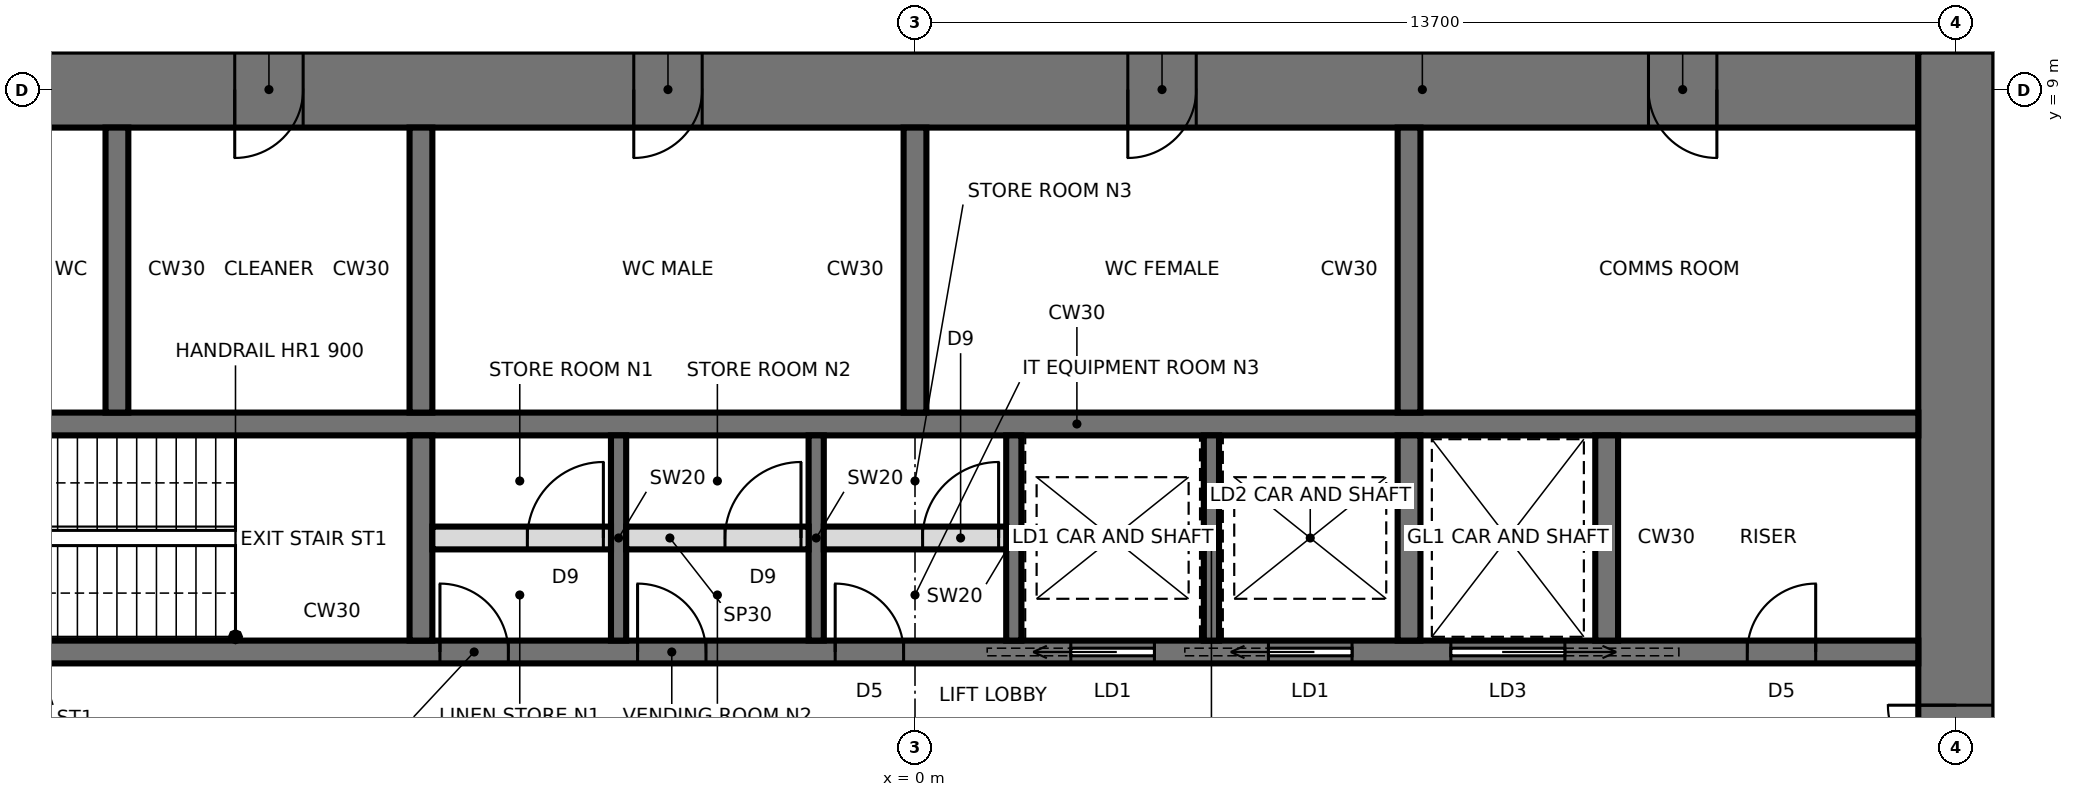
"""IFC4 building model, lengths in metres.
Left out: names, types, materials, properties, quantities, classifications, styles, units other than length and angle.
Written with IfcOpenShell. Run it as: python <this file> out.ifc"""

import sys

from ifc_helpers import new_model, si_unit, direction, frame, frame_2d, origin, place, context, subcontext, project, spatial, rectangle, extrude, element, fill, save


model = new_model("IFC4")
c1 = context("Model", 3, precision=1e-05, world=origin(), true_north=direction((0.0, 1.0)))
c2 = subcontext(c1, "Body", "Model", "MODEL_VIEW")
j1 = project(units=[si_unit("LENGTHUNIT", "METRE"), si_unit("PLANEANGLEUNIT", "RADIAN")], contexts=[c1])
p1 = place(None, origin())
s1 = spatial("IfcSite", under=j1, at=p1, CompositionType="ELEMENT")
p2 = place(p1, origin())
s2 = spatial("IfcBuilding", under=s1, at=p2, CompositionType="ELEMENT")
p3 = place(p2, frame((0.0, 0.0, 268.6)))
s3 = spatial("IfcBuildingStorey", under=s2, at=p3, CompositionType="ELEMENT", Elevation=268.6)
p4 = place(p3, frame((13.2, 9.0, 0.0), z_axis=(0.0, 0.0, 1.0), x_axis=(-1.0, 0.0, 0.0)))
e1 = element("IfcWall", 1, at=p4, inside=s3, PredefinedType="SHEAR", context=c2, shape_type="SweptSolid", body=[
    extrude(rectangle(XDim=26.4, YDim=1.0, at=frame_2d((13.2, 0.0))), origin(), (0.0, 0.0, 1.0), 4.2),
])
p5 = place(p4, frame((2.65, 0.0, 0.0)))
e2 = element("IfcOpeningElement", 2, at=p5, cuts=e1, PredefinedType="OPENING", context=c2, shape_type="SweptSolid", body=[
    extrude(rectangle(XDim=0.9, YDim=2.1, at=frame_2d((0.45, 1.05))), frame((0.0, 0.51, 0.0), z_axis=(0.0, -1.0, 0.0), x_axis=(1.0, 0.0, 0.0)), (0.0, 0.0, 1.0), 1.02),
])
p6 = place(p4, frame((9.5, 0.0, 0.0)))
e3 = element("IfcOpeningElement", 3, at=p6, cuts=e1, PredefinedType="OPENING", context=c2, shape_type="SweptSolid", body=[
    extrude(rectangle(XDim=0.9, YDim=2.1, at=frame_2d((0.45, 1.05))), frame((0.0, 0.51, 0.0), z_axis=(0.0, -1.0, 0.0), x_axis=(1.0, 0.0, 0.0)), (0.0, 0.0, 1.0), 1.02),
])
p7 = place(p4, frame((16.0, 0.0, 0.0)))
e4 = element("IfcOpeningElement", 4, at=p7, cuts=e1, PredefinedType="OPENING", context=c2, shape_type="SweptSolid", body=[
    extrude(rectangle(XDim=0.9, YDim=2.1, at=frame_2d((0.45, 1.05))), frame((0.0, 0.51, 0.0), z_axis=(0.0, -1.0, 0.0), x_axis=(1.0, 0.0, 0.0)), (0.0, 0.0, 1.0), 1.02),
])
p8 = place(p4, frame((21.25, 0.0, 0.0)))
e5 = element("IfcOpeningElement", 5, at=p8, cuts=e1, PredefinedType="OPENING", context=c2, shape_type="SweptSolid", body=[
    extrude(rectangle(XDim=0.9, YDim=2.1, at=frame_2d((0.45, 1.05))), frame((0.0, 0.51, 0.0), z_axis=(0.0, -1.0, 0.0), x_axis=(1.0, 0.0, 0.0)), (0.0, 0.0, 1.0), 1.02),
])
p9 = place(p4, frame((24.8, 0.0, 0.0)))
e6 = element("IfcOpeningElement", 6, at=p9, cuts=e1, PredefinedType="OPENING", context=c2, shape_type="SweptSolid", body=[
    extrude(rectangle(XDim=1.0, YDim=2.1, at=frame_2d((0.5, 1.05))), frame((0.0, 0.51, 0.0), z_axis=(0.0, -1.0, 0.0), x_axis=(1.0, 0.0, 0.0)), (0.0, 0.0, 1.0), 1.02),
])
p10 = place(p3, frame((13.7, -9.5, 0.0), z_axis=(0.0, 0.0, 1.0), x_axis=(0.0, 1.0, 0.0)))
e7 = element("IfcWall", 7, at=p10, inside=s3, PredefinedType="SHEAR", context=c2, shape_type="SweptSolid", body=[
    extrude(rectangle(XDim=19.0, YDim=1.0, at=frame_2d((9.5, 0.0))), origin(), (0.0, 0.0, 1.0), 4.2),
])
p11 = place(p10, frame((8.6, 0.0, 0.0)))
e8 = element("IfcOpeningElement", 8, at=p11, cuts=e7, PredefinedType="OPENING", context=c2, shape_type="SweptSolid", body=[
    extrude(rectangle(XDim=1.8, YDim=2.4, at=frame_2d((0.9, 1.2))), frame((0.0, 0.51, 0.0), z_axis=(0.0, -1.0, 0.0), x_axis=(1.0, 0.0, 0.0)), (0.0, 0.0, 1.0), 1.02),
])
p12 = place(p3, frame((-13.2, 1.6, 0.0), z_axis=(0.0, 0.0, 1.0), x_axis=(1.0, 0.0, 0.0)))
e9 = element("IfcWall", 9, at=p12, inside=s3, PredefinedType="SHEAR", context=c2, shape_type="SweptSolid", body=[
    extrude(rectangle(XDim=26.4, YDim=0.3, at=frame_2d((13.2, 0.0))), origin(), (0.0, 0.0, 1.0), 4.2),
])
p13 = place(p12, frame((0.25, 0.0, 0.0)))
e10 = element("IfcOpeningElement", 10, at=p13, cuts=e9, PredefinedType="OPENING", context=c2, shape_type="SweptSolid", body=[
    extrude(rectangle(XDim=1.0, YDim=2.1, at=frame_2d((0.5, 1.05))), frame((0.0, 0.16, 0.0), z_axis=(0.0, -1.0, 0.0), x_axis=(1.0, 0.0, 0.0)), (0.0, 0.0, 1.0), 0.32),
])
p14 = place(p12, frame((20.25, 0.0, 0.0)))
e11 = element("IfcOpeningElement", 11, at=p14, cuts=e9, PredefinedType="OPENING", context=c2, shape_type="SweptSolid", body=[
    extrude(rectangle(XDim=1.5, YDim=2.4, at=frame_2d((0.75, 1.2))), frame((0.0, 0.16, 0.0), z_axis=(0.0, -1.0, 0.0), x_axis=(1.0, 0.0, 0.0)), (0.0, 0.0, 1.0), 0.32),
])
p15 = place(p12, frame((6.95, 0.0, 0.0)))
e12 = element("IfcOpeningElement", 12, at=p15, cuts=e9, PredefinedType="OPENING", context=c2, shape_type="SweptSolid", body=[
    extrude(rectangle(XDim=0.9, YDim=2.1, at=frame_2d((0.45, 1.05))), frame((0.0, 0.16, 0.0), z_axis=(0.0, -1.0, 0.0), x_axis=(1.0, 0.0, 0.0)), (0.0, 0.0, 1.0), 0.32),
])
p16 = place(p12, frame((9.55, 0.0, 0.0)))
e13 = element("IfcOpeningElement", 13, at=p16, cuts=e9, PredefinedType="OPENING", context=c2, shape_type="SweptSolid", body=[
    extrude(rectangle(XDim=0.9, YDim=2.1, at=frame_2d((0.45, 1.05))), frame((0.0, 0.16, 0.0), z_axis=(0.0, -1.0, 0.0), x_axis=(1.0, 0.0, 0.0)), (0.0, 0.0, 1.0), 0.32),
])
p17 = place(p12, frame((12.15, 0.0, 0.0)))
e14 = element("IfcOpeningElement", 14, at=p17, cuts=e9, PredefinedType="OPENING", context=c2, shape_type="SweptSolid", body=[
    extrude(rectangle(XDim=0.9, YDim=2.1, at=frame_2d((0.45, 1.05))), frame((0.0, 0.16, 0.0), z_axis=(0.0, -1.0, 0.0), x_axis=(1.0, 0.0, 0.0)), (0.0, 0.0, 1.0), 0.32),
])
p18 = place(p12, frame((15.25, 0.0, 0.0)))
e15 = element("IfcOpeningElement", 15, at=p18, cuts=e9, PredefinedType="OPENING", context=c2, shape_type="SweptSolid", body=[
    extrude(rectangle(XDim=1.1, YDim=2.3, at=frame_2d((0.55, 1.15))), frame((0.0, 0.16, 0.0), z_axis=(0.0, -1.0, 0.0), x_axis=(1.0, 0.0, 0.0)), (0.0, 0.0, 1.0), 0.32),
])
p19 = place(p12, frame((17.85, 0.0, 0.0)))
e16 = element("IfcOpeningElement", 16, at=p19, cuts=e9, PredefinedType="OPENING", context=c2, shape_type="SweptSolid", body=[
    extrude(rectangle(XDim=1.1, YDim=2.3, at=frame_2d((0.55, 1.15))), frame((0.0, 0.16, 0.0), z_axis=(0.0, -1.0, 0.0), x_axis=(1.0, 0.0, 0.0)), (0.0, 0.0, 1.0), 0.32),
])
p20 = place(p12, frame((24.15, 0.0, 0.0)))
e17 = element("IfcOpeningElement", 17, at=p20, cuts=e9, PredefinedType="OPENING", context=c2, shape_type="SweptSolid", body=[
    extrude(rectangle(XDim=0.9, YDim=2.1, at=frame_2d((0.45, 1.05))), frame((0.0, 0.16, 0.0), z_axis=(0.0, -1.0, 0.0), x_axis=(1.0, 0.0, 0.0)), (0.0, 0.0, 1.0), 0.32),
])
p21 = place(p3, frame((-13.2, 4.6, 0.0), z_axis=(0.0, 0.0, 1.0), x_axis=(1.0, 0.0, 0.0)))
e18 = element("IfcWall", 18, at=p21, inside=s3, PredefinedType="SHEAR", context=c2, shape_type="SweptSolid", body=[
    extrude(rectangle(XDim=26.4, YDim=0.3, at=frame_2d((13.2, 0.0))), origin(), (0.0, 0.0, 1.0), 4.2),
])
p22 = place(p3, frame((-6.5, 1.75, 0.0), z_axis=(0.0, 0.0, 1.0), x_axis=(0.0, 1.0, 0.0)))
e19 = element("IfcWall", 19, at=p22, inside=s3, PredefinedType="SHEAR", context=c2, shape_type="SweptSolid", body=[
    extrude(rectangle(XDim=2.7, YDim=0.3, at=frame_2d((1.35, 0.0))), origin(), (0.0, 0.0, 1.0), 4.2),
])
p23 = place(p3, frame((-6.5, 4.75, 0.0), z_axis=(0.0, 0.0, 1.0), x_axis=(0.0, 1.0, 0.0)))
e20 = element("IfcWall", 20, at=p23, inside=s3, PredefinedType="SHEAR", context=c2, shape_type="SweptSolid", body=[
    extrude(rectangle(XDim=3.75, YDim=0.3, at=frame_2d((1.875, 0.0))), origin(), (0.0, 0.0, 1.0), 4.2),
])
p24 = place(p3, frame((6.5, 1.75, 0.0), z_axis=(0.0, 0.0, 1.0), x_axis=(0.0, 1.0, 0.0)))
e21 = element("IfcWall", 21, at=p24, inside=s3, PredefinedType="SHEAR", context=c2, shape_type="SweptSolid", body=[
    extrude(rectangle(XDim=2.7, YDim=0.3, at=frame_2d((1.35, 0.0))), origin(), (0.0, 0.0, 1.0), 4.2),
])
p25 = place(p3, frame((6.5, 4.75, 0.0), z_axis=(0.0, 0.0, 1.0), x_axis=(0.0, 1.0, 0.0)))
e22 = element("IfcWall", 22, at=p25, inside=s3, PredefinedType="SHEAR", context=c2, shape_type="SweptSolid", body=[
    extrude(rectangle(XDim=3.75, YDim=0.3, at=frame_2d((1.875, 0.0))), origin(), (0.0, 0.0, 1.0), 4.2),
])
for number, where, z_axis, x_axis in (
    (23, (-3.9, 1.75, 0.0), (0.0, 0.0, 1.0), (0.0, 1.0, 0.0)),
    (24, (-1.3, 1.75, 0.0), (0.0, 0.0, 1.0), (0.0, 1.0, 0.0)),
    (25, (1.3, 1.75, 0.0), (0.0, 0.0, 1.0), (0.0, 1.0, 0.0)),
    (26, (3.9, 1.75, 0.0), (0.0, 0.0, 1.0), (0.0, 1.0, 0.0)),
):
    element("IfcWall", number, at=place(p3, frame(where, z_axis=z_axis, x_axis=x_axis)), inside=s3, PredefinedType="SHEAR", context=c2, shape_type="SweptSolid", body=[
        extrude(rectangle(XDim=2.7, YDim=0.2, at=frame_2d((1.35, 0.0))), origin(), (0.0, 0.0, 1.0), 4.2),
    ])
for number, where, z_axis, x_axis in (
    (27, (0.0, 4.75, 0.0), (0.0, 0.0, 1.0), (0.0, 1.0, 0.0)),
    (28, (-10.5, 4.75, 0.0), (0.0, 0.0, 1.0), (0.0, 1.0, 0.0)),
):
    element("IfcWall", number, at=place(p3, frame(where, z_axis=z_axis, x_axis=x_axis)), inside=s3, PredefinedType="SHEAR", context=c2, shape_type="SweptSolid", body=[
        extrude(rectangle(XDim=3.75, YDim=0.3, at=frame_2d((1.875, 0.0))), origin(), (0.0, 0.0, 1.0), 4.2),
    ])
p26 = place(p3, frame((9.1, 1.75, 0.0), z_axis=(0.0, 0.0, 1.0), x_axis=(0.0, 1.0, 0.0)))
e29 = element("IfcWall", 29, at=p26, inside=s3, PredefinedType="SHEAR", context=c2, shape_type="SweptSolid", body=[
    extrude(rectangle(XDim=2.7, YDim=0.3, at=frame_2d((1.35, 0.0))), origin(), (0.0, 0.0, 1.0), 4.2),
])
p27 = place(p3, frame((-6.35, 3.1, 0.0), z_axis=(0.0, 0.0, 1.0), x_axis=(1.0, 0.0, 0.0)))
e30 = element("IfcWall", 30, at=p27, inside=s3, PredefinedType="PARTITIONING", context=c2, shape_type="SweptSolid", body=[
    extrude(rectangle(XDim=2.35, YDim=0.3, at=frame_2d((1.175, 0.0))), origin(), (0.0, 0.0, 1.0), 4.04),
])
p28 = place(p27, frame((1.25, 0.0, 0.0)))
e31 = element("IfcOpeningElement", 31, at=p28, cuts=e30, PredefinedType="OPENING", context=c2, shape_type="SweptSolid", body=[
    extrude(rectangle(XDim=1.0, YDim=2.4, at=frame_2d((0.5, 1.2))), frame((0.0, 0.16, 0.0), z_axis=(0.0, -1.0, 0.0), x_axis=(1.0, 0.0, 0.0)), (0.0, 0.0, 1.0), 0.32),
])
p29 = place(p3, frame((-3.8, 3.1, 0.0), z_axis=(0.0, 0.0, 1.0), x_axis=(1.0, 0.0, 0.0)))
e32 = element("IfcWall", 32, at=p29, inside=s3, PredefinedType="PARTITIONING", context=c2, shape_type="SweptSolid", body=[
    extrude(rectangle(XDim=2.4, YDim=0.3, at=frame_2d((1.2, 0.0))), origin(), (0.0, 0.0, 1.0), 4.04),
])
p30 = place(p29, frame((1.3, 0.0, 0.0)))
e33 = element("IfcOpeningElement", 33, at=p30, cuts=e32, PredefinedType="OPENING", context=c2, shape_type="SweptSolid", body=[
    extrude(rectangle(XDim=1.0, YDim=2.4, at=frame_2d((0.5, 1.2))), frame((0.0, 0.16, 0.0), z_axis=(0.0, -1.0, 0.0), x_axis=(1.0, 0.0, 0.0)), (0.0, 0.0, 1.0), 0.32),
])
p31 = place(p3, frame((-1.2, 3.1, 0.0), z_axis=(0.0, 0.0, 1.0), x_axis=(1.0, 0.0, 0.0)))
e34 = element("IfcWall", 34, at=p31, inside=s3, PredefinedType="PARTITIONING", context=c2, shape_type="SweptSolid", body=[
    extrude(rectangle(XDim=2.4, YDim=0.3, at=frame_2d((1.2, 0.0))), origin(), (0.0, 0.0, 1.0), 4.04),
])
p32 = place(p31, frame((1.3, 0.0, 0.0)))
e35 = element("IfcOpeningElement", 35, at=p32, cuts=e34, PredefinedType="OPENING", context=c2, shape_type="SweptSolid", body=[
    extrude(rectangle(XDim=1.0, YDim=2.4, at=frame_2d((0.5, 1.2))), frame((0.0, 0.16, 0.0), z_axis=(0.0, -1.0, 0.0), x_axis=(1.0, 0.0, 0.0)), (0.0, 0.0, 1.0), 0.32),
])
p33 = place(p11, origin())
e36 = element("IfcDoor", 36, at=p33, inside=s3, OperationType="DOUBLE_DOOR_SINGLE_SWING", PredefinedType="DOOR", context=c2, shape_type="SweptSolid", body=[
    extrude(rectangle(XDim=1.72, YDim=2.36, at=frame_2d((0.9, 1.18))), frame((0.0, 0.025, 0.0), z_axis=(0.0, -1.0, 0.0), x_axis=(1.0, 0.0, 0.0)), (0.0, 0.0, 1.0), 0.05),
    extrude(rectangle(XDim=0.04, YDim=2.4, at=frame_2d((0.02, 1.2))), frame((0.0, 0.25, 0.0), z_axis=(0.0, -1.0, 0.0), x_axis=(1.0, 0.0, 0.0)), (0.0, 0.0, 1.0), 0.5),
    extrude(rectangle(XDim=0.04, YDim=2.4, at=frame_2d((1.78, 1.2))), frame((0.0, 0.25, 0.0), z_axis=(0.0, -1.0, 0.0), x_axis=(1.0, 0.0, 0.0)), (0.0, 0.0, 1.0), 0.5),
    extrude(rectangle(XDim=1.72, YDim=0.04, at=frame_2d((0.9, 2.38))), frame((0.0, 0.25, 0.0), z_axis=(0.0, -1.0, 0.0), x_axis=(1.0, 0.0, 0.0)), (0.0, 0.0, 1.0), 0.5),
])
fill(e8, e36)
p34 = place(p14, origin())
e37 = element("IfcDoor", 37, at=p34, inside=s3, OperationType="SLIDING_TO_RIGHT", PredefinedType="DOOR", context=c2, shape_type="SweptSolid", body=[
    extrude(rectangle(XDim=1.5, YDim=2.4, at=frame_2d((0.75, 1.2))), frame((0.0, 0.025, 0.0), z_axis=(0.0, -1.0, 0.0), x_axis=(1.0, 0.0, 0.0)), (0.0, 0.0, 1.0), 0.05),
])
fill(e11, e37)
p35 = place(p28, origin())
e38 = element("IfcDoor", 38, at=p35, inside=s3, OperationType="SINGLE_SWING_RIGHT", PredefinedType="DOOR", context=c2, shape_type="SweptSolid", body=[
    extrude(rectangle(XDim=1.0, YDim=2.4, at=frame_2d((0.5, 1.2))), frame((0.0, 0.025, 0.0), z_axis=(0.0, -1.0, 0.0), x_axis=(1.0, 0.0, 0.0)), (0.0, 0.0, 1.0), 0.05),
])
fill(e31, e38)
p36 = place(p15, origin())
e39 = element("IfcDoor", 39, at=p36, inside=s3, OperationType="SINGLE_SWING_LEFT", PredefinedType="DOOR", context=c2, shape_type="SweptSolid", body=[
    extrude(rectangle(XDim=0.9, YDim=2.1, at=frame_2d((0.45, 1.05))), frame((0.0, 0.025, 0.0), z_axis=(0.0, -1.0, 0.0), x_axis=(1.0, 0.0, 0.0)), (0.0, 0.0, 1.0), 0.05),
])
fill(e12, e39)
p37 = place(p30, origin())
e40 = element("IfcDoor", 40, at=p37, inside=s3, OperationType="SINGLE_SWING_RIGHT", PredefinedType="DOOR", context=c2, shape_type="SweptSolid", body=[
    extrude(rectangle(XDim=1.0, YDim=2.4, at=frame_2d((0.5, 1.2))), frame((0.0, 0.025, 0.0), z_axis=(0.0, -1.0, 0.0), x_axis=(1.0, 0.0, 0.0)), (0.0, 0.0, 1.0), 0.05),
])
fill(e33, e40)
p38 = place(p16, origin())
e41 = element("IfcDoor", 41, at=p38, inside=s3, OperationType="SINGLE_SWING_LEFT", PredefinedType="DOOR", context=c2, shape_type="SweptSolid", body=[
    extrude(rectangle(XDim=0.9, YDim=2.1, at=frame_2d((0.45, 1.05))), frame((0.0, 0.025, 0.0), z_axis=(0.0, -1.0, 0.0), x_axis=(1.0, 0.0, 0.0)), (0.0, 0.0, 1.0), 0.05),
])
fill(e13, e41)
p39 = place(p32, origin())
e42 = element("IfcDoor", 42, at=p39, inside=s3, OperationType="SINGLE_SWING_RIGHT", PredefinedType="DOOR", context=c2, shape_type="SweptSolid", body=[
    extrude(rectangle(XDim=1.0, YDim=2.4, at=frame_2d((0.5, 1.2))), frame((0.0, 0.025, 0.0), z_axis=(0.0, -1.0, 0.0), x_axis=(1.0, 0.0, 0.0)), (0.0, 0.0, 1.0), 0.05),
])
fill(e35, e42)
p40 = place(p17, origin())
e43 = element("IfcDoor", 43, at=p40, inside=s3, OperationType="SINGLE_SWING_LEFT", PredefinedType="DOOR", context=c2, shape_type="SweptSolid", body=[
    extrude(rectangle(XDim=0.9, YDim=2.1, at=frame_2d((0.45, 1.05))), frame((0.0, 0.025, 0.0), z_axis=(0.0, -1.0, 0.0), x_axis=(1.0, 0.0, 0.0)), (0.0, 0.0, 1.0), 0.05),
])
fill(e14, e43)
p41 = place(p18, origin())
e44 = element("IfcDoor", 44, at=p41, inside=s3, OperationType="SLIDING_TO_LEFT", PredefinedType="DOOR", context=c2, shape_type="SweptSolid", body=[
    extrude(rectangle(XDim=1.1, YDim=2.3, at=frame_2d((0.55, 1.15))), frame((0.0, 0.025, 0.0), z_axis=(0.0, -1.0, 0.0), x_axis=(1.0, 0.0, 0.0)), (0.0, 0.0, 1.0), 0.05),
])
fill(e15, e44)
p42 = place(p19, origin())
e45 = element("IfcDoor", 45, at=p42, inside=s3, OperationType="SLIDING_TO_LEFT", PredefinedType="DOOR", context=c2, shape_type="SweptSolid", body=[
    extrude(rectangle(XDim=1.1, YDim=2.3, at=frame_2d((0.55, 1.15))), frame((0.0, 0.025, 0.0), z_axis=(0.0, -1.0, 0.0), x_axis=(1.0, 0.0, 0.0)), (0.0, 0.0, 1.0), 0.05),
])
fill(e16, e45)
p43 = place(p20, origin())
e46 = element("IfcDoor", 46, at=p43, inside=s3, OperationType="SINGLE_SWING_RIGHT", PredefinedType="DOOR", context=c2, shape_type="SweptSolid", body=[
    extrude(rectangle(XDim=0.9, YDim=2.1, at=frame_2d((0.45, 1.05))), frame((0.0, 0.025, 0.0), z_axis=(0.0, -1.0, 0.0), x_axis=(1.0, 0.0, 0.0)), (0.0, 0.0, 1.0), 0.05),
])
fill(e17, e46)
p44 = place(p5, origin())
e47 = element("IfcDoor", 47, at=p44, inside=s3, OperationType="SINGLE_SWING_LEFT", PredefinedType="DOOR", context=c2, shape_type="SweptSolid", body=[
    extrude(rectangle(XDim=0.82, YDim=2.06, at=frame_2d((0.45, 1.03))), frame((0.0, 0.025, 0.0), z_axis=(0.0, -1.0, 0.0), x_axis=(1.0, 0.0, 0.0)), (0.0, 0.0, 1.0), 0.05),
    extrude(rectangle(XDim=0.04, YDim=2.1, at=frame_2d((0.02, 1.05))), frame((0.0, 0.25, 0.0), z_axis=(0.0, -1.0, 0.0), x_axis=(1.0, 0.0, 0.0)), (0.0, 0.0, 1.0), 0.5),
    extrude(rectangle(XDim=0.04, YDim=2.1, at=frame_2d((0.88, 1.05))), frame((0.0, 0.25, 0.0), z_axis=(0.0, -1.0, 0.0), x_axis=(1.0, 0.0, 0.0)), (0.0, 0.0, 1.0), 0.5),
    extrude(rectangle(XDim=0.82, YDim=0.04, at=frame_2d((0.45, 2.08))), frame((0.0, 0.25, 0.0), z_axis=(0.0, -1.0, 0.0), x_axis=(1.0, 0.0, 0.0)), (0.0, 0.0, 1.0), 0.5),
])
fill(e2, e47)
p45 = place(p6, origin())
e48 = element("IfcDoor", 48, at=p45, inside=s3, OperationType="SINGLE_SWING_RIGHT", PredefinedType="DOOR", context=c2, shape_type="SweptSolid", body=[
    extrude(rectangle(XDim=0.82, YDim=2.06, at=frame_2d((0.45, 1.03))), frame((0.0, 0.025, 0.0), z_axis=(0.0, -1.0, 0.0), x_axis=(1.0, 0.0, 0.0)), (0.0, 0.0, 1.0), 0.05),
    extrude(rectangle(XDim=0.04, YDim=2.1, at=frame_2d((0.02, 1.05))), frame((0.0, 0.25, 0.0), z_axis=(0.0, -1.0, 0.0), x_axis=(1.0, 0.0, 0.0)), (0.0, 0.0, 1.0), 0.5),
    extrude(rectangle(XDim=0.04, YDim=2.1, at=frame_2d((0.88, 1.05))), frame((0.0, 0.25, 0.0), z_axis=(0.0, -1.0, 0.0), x_axis=(1.0, 0.0, 0.0)), (0.0, 0.0, 1.0), 0.5),
    extrude(rectangle(XDim=0.82, YDim=0.04, at=frame_2d((0.45, 2.08))), frame((0.0, 0.25, 0.0), z_axis=(0.0, -1.0, 0.0), x_axis=(1.0, 0.0, 0.0)), (0.0, 0.0, 1.0), 0.5),
])
fill(e3, e48)
p46 = place(p7, origin())
e49 = element("IfcDoor", 49, at=p46, inside=s3, OperationType="SINGLE_SWING_RIGHT", PredefinedType="DOOR", context=c2, shape_type="SweptSolid", body=[
    extrude(rectangle(XDim=0.82, YDim=2.06, at=frame_2d((0.45, 1.03))), frame((0.0, 0.025, 0.0), z_axis=(0.0, -1.0, 0.0), x_axis=(1.0, 0.0, 0.0)), (0.0, 0.0, 1.0), 0.05),
    extrude(rectangle(XDim=0.04, YDim=2.1, at=frame_2d((0.02, 1.05))), frame((0.0, 0.25, 0.0), z_axis=(0.0, -1.0, 0.0), x_axis=(1.0, 0.0, 0.0)), (0.0, 0.0, 1.0), 0.5),
    extrude(rectangle(XDim=0.04, YDim=2.1, at=frame_2d((0.88, 1.05))), frame((0.0, 0.25, 0.0), z_axis=(0.0, -1.0, 0.0), x_axis=(1.0, 0.0, 0.0)), (0.0, 0.0, 1.0), 0.5),
    extrude(rectangle(XDim=0.82, YDim=0.04, at=frame_2d((0.45, 2.08))), frame((0.0, 0.25, 0.0), z_axis=(0.0, -1.0, 0.0), x_axis=(1.0, 0.0, 0.0)), (0.0, 0.0, 1.0), 0.5),
])
fill(e4, e49)
p47 = place(p8, origin())
e50 = element("IfcDoor", 50, at=p47, inside=s3, OperationType="SINGLE_SWING_RIGHT", PredefinedType="DOOR", context=c2, shape_type="SweptSolid", body=[
    extrude(rectangle(XDim=0.82, YDim=2.06, at=frame_2d((0.45, 1.03))), frame((0.0, 0.025, 0.0), z_axis=(0.0, -1.0, 0.0), x_axis=(1.0, 0.0, 0.0)), (0.0, 0.0, 1.0), 0.05),
    extrude(rectangle(XDim=0.04, YDim=2.1, at=frame_2d((0.02, 1.05))), frame((0.0, 0.25, 0.0), z_axis=(0.0, -1.0, 0.0), x_axis=(1.0, 0.0, 0.0)), (0.0, 0.0, 1.0), 0.5),
    extrude(rectangle(XDim=0.04, YDim=2.1, at=frame_2d((0.88, 1.05))), frame((0.0, 0.25, 0.0), z_axis=(0.0, -1.0, 0.0), x_axis=(1.0, 0.0, 0.0)), (0.0, 0.0, 1.0), 0.5),
    extrude(rectangle(XDim=0.82, YDim=0.04, at=frame_2d((0.45, 2.08))), frame((0.0, 0.25, 0.0), z_axis=(0.0, -1.0, 0.0), x_axis=(1.0, 0.0, 0.0)), (0.0, 0.0, 1.0), 0.5),
])
fill(e5, e50)
save(model, sys.argv[1])
